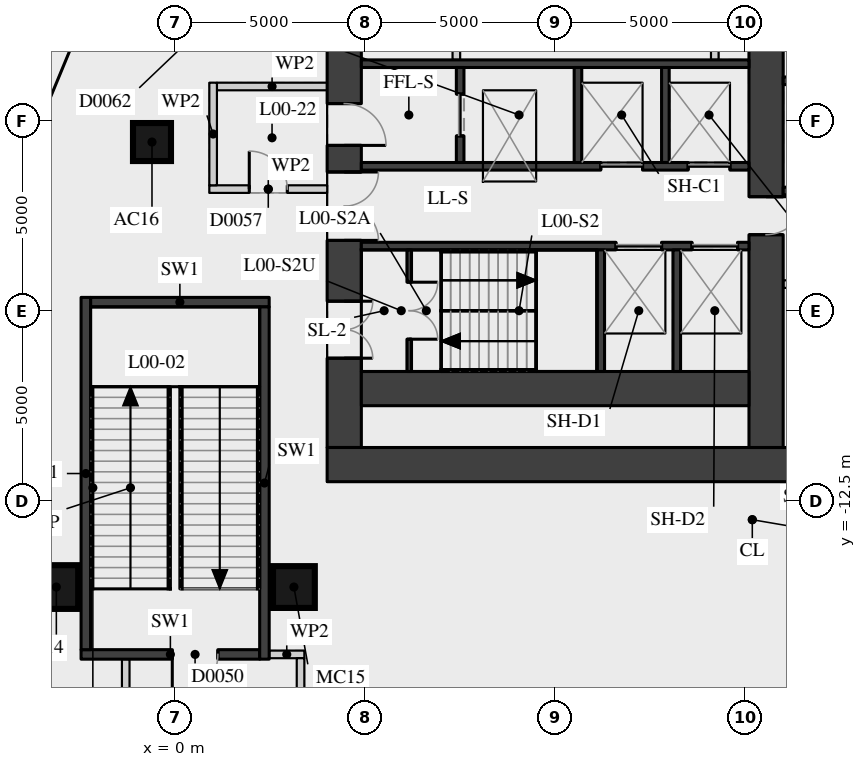
"""IFC4 building model, lengths in metres.
Left out: names, types, materials, properties, quantities, classifications, styles, units other than length and angle.
Written with IfcOpenShell. Run it as: python <this file> out.ifc"""

import sys

from ifc_helpers import new_model, si_unit, direction, frame, frame_2d, origin, origin_2d, place, context, subcontext, project, spatial, rectangle, extrude, element, fill, save


model = new_model("IFC4")
c1 = context("Model", 3, precision=1e-05, world=origin(), true_north=direction((0.0, 1.0)))
c2 = subcontext(c1, "Body", "Model", "MODEL_VIEW")
j1 = project(units=[si_unit("LENGTHUNIT", "METRE"), si_unit("PLANEANGLEUNIT", "RADIAN")], contexts=[c1])
p1 = place(None, origin())
s1 = spatial("IfcSite", under=j1, at=p1, CompositionType="ELEMENT")
p2 = place(p1, origin())
s2 = spatial("IfcBuilding", under=s1, at=p2, CompositionType="ELEMENT")
p3 = place(p2, origin())
s3 = spatial("IfcBuildingStorey", under=s2, at=p3, CompositionType="ELEMENT", Elevation=0.0)
p4 = place(p3, frame((-0.609, -3.062, 0.0), z_axis=(0.0, 0.0, 1.0), x_axis=(1.0, 0.0, 0.0)))
e1 = element("IfcColumn", 1, at=p4, inside=s3, PredefinedType="COLUMN", context=c2, shape_type="SweptSolid", body=[
    extrude(rectangle(XDim=1.0, YDim=1.0, at=origin_2d()), origin(), (0.0, 0.0, 1.0), 7.5),
])
p5 = place(p3, frame((-3.126, -14.772, 0.0), z_axis=(0.0, 0.0, 1.0), x_axis=(1.0, 0.0, 0.0)))
e2 = element("IfcColumn", 2, at=p5, inside=s3, PredefinedType="COLUMN", context=c2, shape_type="SweptSolid", body=[
    extrude(rectangle(XDim=1.15, YDim=1.15, at=origin_2d()), origin(), (0.0, 0.0, 1.0), 7.5),
])
p6 = place(p3, frame((3.126, -14.772, 0.0), z_axis=(0.0, 0.0, 1.0), x_axis=(1.0, 0.0, 0.0)))
e3 = element("IfcColumn", 3, at=p6, inside=s3, PredefinedType="COLUMN", context=c2, shape_type="SweptSolid", body=[
    extrude(rectangle(XDim=1.1, YDim=1.1, at=origin_2d()), origin(), (0.0, 0.0, 1.0), 7.5),
])
p7 = place(p3, frame((4.45, -11.1, 0.0), z_axis=(0.0, 0.0, 1.0), x_axis=(0.0, 1.0, 0.0)))
e4 = element("IfcWall", 4, at=p7, inside=s3, PredefinedType="SHEAR", context=c2, shape_type="SweptSolid", body=[
    extrude(rectangle(XDim=22.2, YDim=0.9, at=frame_2d((11.1, 0.0))), origin(), (0.0, 0.0, 1.0), 7.09),
])
p8 = place(p7, frame((2.35, 0.0, 0.0)))
e5 = element("IfcOpeningElement", 5, at=p8, cuts=e4, PredefinedType="OPENING", context=c2, shape_type="SweptSolid", body=[
    extrude(rectangle(XDim=1.5, YDim=2.1, at=frame_2d((0.75, 1.05))), frame((0.0, 0.46, 0.0), z_axis=(0.0, -1.0, 0.0), x_axis=(1.0, 0.0, 0.0)), (0.0, 0.0, 1.0), 0.92),
])
p9 = place(p7, frame((5.45, 0.0, 0.0)))
e6 = element("IfcOpeningElement", 6, at=p9, cuts=e4, PredefinedType="OPENING", context=c2, shape_type="SweptSolid", body=[
    extrude(rectangle(XDim=1.8, YDim=2.1, at=frame_2d((0.9, 1.05))), frame((0.0, 0.46, 0.0), z_axis=(0.0, -1.0, 0.0), x_axis=(1.0, 0.0, 0.0)), (0.0, 0.0, 1.0), 0.92),
])
p10 = place(p7, frame((7.95, 0.0, 0.0)))
e7 = element("IfcOpeningElement", 7, at=p10, cuts=e4, PredefinedType="OPENING", context=c2, shape_type="SweptSolid", body=[
    extrude(rectangle(XDim=1.1, YDim=2.1, at=frame_2d((0.55, 1.05))), frame((0.0, 0.46, 0.0), z_axis=(0.0, -1.0, 0.0), x_axis=(1.0, 0.0, 0.0)), (0.0, 0.0, 1.0), 0.92),
])
p11 = place(p7, frame((10.6, 0.0, 0.0)))
e8 = element("IfcOpeningElement", 8, at=p11, cuts=e4, PredefinedType="OPENING", context=c2, shape_type="SweptSolid", body=[
    extrude(rectangle(XDim=1.0, YDim=2.1, at=frame_2d((0.5, 1.05))), frame((0.0, 0.46, 0.0), z_axis=(0.0, -1.0, 0.0), x_axis=(1.0, 0.0, 0.0)), (0.0, 0.0, 1.0), 0.92),
])
p12 = place(p7, frame((13.15, 0.0, 0.0)))
e9 = element("IfcOpeningElement", 9, at=p12, cuts=e4, PredefinedType="OPENING", context=c2, shape_type="SweptSolid", body=[
    extrude(rectangle(XDim=1.1, YDim=2.1, at=frame_2d((0.55, 1.05))), frame((0.0, 0.46, 0.0), z_axis=(0.0, -1.0, 0.0), x_axis=(1.0, 0.0, 0.0)), (0.0, 0.0, 1.0), 0.92),
])
p13 = place(p7, frame((14.95, 0.0, 0.0)))
e10 = element("IfcOpeningElement", 10, at=p13, cuts=e4, PredefinedType="OPENING", context=c2, shape_type="SweptSolid", body=[
    extrude(rectangle(XDim=1.8, YDim=2.1, at=frame_2d((0.9, 1.05))), frame((0.0, 0.46, 0.0), z_axis=(0.0, -1.0, 0.0), x_axis=(1.0, 0.0, 0.0)), (0.0, 0.0, 1.0), 0.92),
])
p14 = place(p7, frame((18.35, 0.0, 0.0)))
e11 = element("IfcOpeningElement", 11, at=p14, cuts=e4, PredefinedType="OPENING", context=c2, shape_type="SweptSolid", body=[
    extrude(rectangle(XDim=1.5, YDim=2.1, at=frame_2d((0.75, 1.05))), frame((0.0, 0.46, 0.0), z_axis=(0.0, -1.0, 0.0), x_axis=(1.0, 0.0, 0.0)), (0.0, 0.0, 1.0), 0.92),
])
p15 = place(p3, frame((4.0, -11.55, 0.0), z_axis=(0.0, 0.0, 1.0), x_axis=(1.0, 0.0, 0.0)))
e12 = element("IfcWall", 12, at=p15, inside=s3, PredefinedType="SHEAR", context=c2, shape_type="SweptSolid", body=[
    extrude(rectangle(XDim=15.2, YDim=0.9, at=frame_2d((7.6, 0.0))), origin(), (0.0, 0.0, 1.0), 7.09),
])
p16 = place(p3, frame((15.55, -11.1, 0.0), z_axis=(0.0, 0.0, 1.0), x_axis=(0.0, 1.0, 0.0)))
e13 = element("IfcWall", 13, at=p16, inside=s3, PredefinedType="SHEAR", context=c2, shape_type="SweptSolid", body=[
    extrude(rectangle(XDim=22.2, YDim=0.9, at=frame_2d((11.1, 0.0))), origin(), (0.0, 0.0, 1.0), 7.09),
])
p17 = place(p16, frame((15.6, 0.0, 0.0)))
e14 = element("IfcOpeningElement", 14, at=p17, cuts=e13, PredefinedType="OPENING", context=c2, shape_type="SweptSolid", body=[
    extrude(rectangle(XDim=1.0, YDim=2.1, at=frame_2d((0.5, 1.05))), frame((0.0, 0.46, 0.0), z_axis=(0.0, -1.0, 0.0), x_axis=(1.0, 0.0, 0.0)), (0.0, 0.0, 1.0), 0.92),
])
p18 = place(p16, frame((5.6, 0.0, 0.0)))
e15 = element("IfcOpeningElement", 15, at=p18, cuts=e13, PredefinedType="OPENING", context=c2, shape_type="SweptSolid", body=[
    extrude(rectangle(XDim=1.0, YDim=2.1, at=frame_2d((0.5, 1.05))), frame((0.0, 0.46, 0.0), z_axis=(0.0, -1.0, 0.0), x_axis=(1.0, 0.0, 0.0)), (0.0, 0.0, 1.0), 0.92),
])
p19 = place(p3, frame((4.9, -9.55, 0.0), z_axis=(0.0, 0.0, 1.0), x_axis=(1.0, 0.0, 0.0)))
e16 = element("IfcWall", 16, at=p19, inside=s3, PredefinedType="SHEAR", context=c2, shape_type="SweptSolid", body=[
    extrude(rectangle(XDim=10.2, YDim=0.9, at=frame_2d((5.1, 0.0))), origin(), (0.0, 0.0, 1.0), 7.09),
])
p20 = place(p3, frame((4.9, -1.0, 0.0), z_axis=(0.0, 0.0, 1.0), x_axis=(1.0, 0.0, 0.0)))
e17 = element("IfcWall", 17, at=p20, inside=s3, PredefinedType="SHEAR", context=c2, shape_type="SweptSolid", body=[
    extrude(rectangle(XDim=10.2, YDim=0.2, at=frame_2d((5.1, 0.0))), origin(), (0.0, 0.0, 1.0), 7.09),
])
p21 = place(p3, frame((4.9, -3.7, 0.0), z_axis=(0.0, 0.0, 1.0), x_axis=(1.0, 0.0, 0.0)))
e18 = element("IfcWall", 18, at=p21, inside=s3, PredefinedType="SHEAR", context=c2, shape_type="SweptSolid", body=[
    extrude(rectangle(XDim=10.2, YDim=0.2, at=frame_2d((5.1, 0.0))), origin(), (0.0, 0.0, 1.0), 7.09),
])
p22 = place(p21, frame((6.3, 0.0, 0.0)))
e19 = element("IfcOpeningElement", 19, at=p22, cuts=e18, PredefinedType="OPENING", context=c2, shape_type="SweptSolid", body=[
    extrude(rectangle(XDim=1.1, YDim=2.1, at=frame_2d((0.55, 1.05))), frame((0.0, 0.11, 0.0), z_axis=(0.0, -1.0, 0.0), x_axis=(1.0, 0.0, 0.0)), (0.0, 0.0, 1.0), 0.22),
])
p23 = place(p21, frame((8.6, 0.0, 0.0)))
e20 = element("IfcOpeningElement", 20, at=p23, cuts=e18, PredefinedType="OPENING", context=c2, shape_type="SweptSolid", body=[
    extrude(rectangle(XDim=1.1, YDim=2.1, at=frame_2d((0.55, 1.05))), frame((0.0, 0.11, 0.0), z_axis=(0.0, -1.0, 0.0), x_axis=(1.0, 0.0, 0.0)), (0.0, 0.0, 1.0), 0.22),
])
p24 = place(p3, frame((4.9, -5.8, 0.0), z_axis=(0.0, 0.0, 1.0), x_axis=(1.0, 0.0, 0.0)))
e21 = element("IfcWall", 21, at=p24, inside=s3, PredefinedType="SHEAR", context=c2, shape_type="SweptSolid", body=[
    extrude(rectangle(XDim=10.2, YDim=0.2, at=frame_2d((5.1, 0.0))), origin(), (0.0, 0.0, 1.0), 7.09),
])
p25 = place(p24, frame((6.7, 0.0, 0.0)))
e22 = element("IfcOpeningElement", 22, at=p25, cuts=e21, PredefinedType="OPENING", context=c2, shape_type="SweptSolid", body=[
    extrude(rectangle(XDim=1.2, YDim=2.1, at=frame_2d((0.6, 1.05))), frame((0.0, 0.11, 0.0), z_axis=(0.0, -1.0, 0.0), x_axis=(1.0, 0.0, 0.0)), (0.0, 0.0, 1.0), 0.22),
])
p26 = place(p24, frame((8.7, 0.0, 0.0)))
e23 = element("IfcOpeningElement", 23, at=p26, cuts=e21, PredefinedType="OPENING", context=c2, shape_type="SweptSolid", body=[
    extrude(rectangle(XDim=1.2, YDim=2.1, at=frame_2d((0.6, 1.05))), frame((0.0, 0.11, 0.0), z_axis=(0.0, -1.0, 0.0), x_axis=(1.0, 0.0, 0.0)), (0.0, 0.0, 1.0), 0.22),
])
for number, where, z_axis, x_axis in (
    (24, (11.2, -9.1, 0.0), (0.0, 0.0, 1.0), (0.0, 1.0, 0.0)),
    (25, (13.2, -9.1, 0.0), (0.0, 0.0, 1.0), (0.0, 1.0, 0.0)),
):
    element("IfcWall", number, at=place(p3, frame(where, z_axis=z_axis, x_axis=x_axis)), inside=s3, PredefinedType="SHEAR", context=c2, shape_type="SweptSolid", body=[
        extrude(rectangle(XDim=3.2, YDim=0.2, at=frame_2d((1.6, 0.0))), origin(), (0.0, 0.0, 1.0), 7.09),
    ])
p27 = place(p3, frame((7.5, -3.6, 0.0), z_axis=(0.0, 0.0, 1.0), x_axis=(0.0, 1.0, 0.0)))
e26 = element("IfcWall", 26, at=p27, inside=s3, PredefinedType="SHEAR", context=c2, shape_type="SweptSolid", body=[
    extrude(rectangle(XDim=2.5, YDim=0.2, at=frame_2d((1.25, 0.0))), origin(), (0.0, 0.0, 1.0), 7.09),
])
p28 = place(p27, frame((0.7, 0.0, 0.0)))
e27 = element("IfcOpeningElement", 27, at=p28, cuts=e26, PredefinedType="OPENING", context=c2, shape_type="SweptSolid", body=[
    extrude(rectangle(XDim=1.1, YDim=2.1, at=frame_2d((0.55, 1.05))), frame((0.0, 0.11, 0.0), z_axis=(0.0, -1.0, 0.0), x_axis=(1.0, 0.0, 0.0)), (0.0, 0.0, 1.0), 0.22),
])
for number, where, z_axis, x_axis in (
    (28, (10.6, -3.6, 0.0), (0.0, 0.0, 1.0), (0.0, 1.0, 0.0)),
    (29, (12.9, -3.6, 0.0), (0.0, 0.0, 1.0), (0.0, 1.0, 0.0)),
):
    element("IfcWall", number, at=place(p3, frame(where, z_axis=z_axis, x_axis=x_axis)), inside=s3, PredefinedType="SHEAR", context=c2, shape_type="SweptSolid", body=[
        extrude(rectangle(XDim=2.5, YDim=0.2, at=frame_2d((1.25, 0.0))), origin(), (0.0, 0.0, 1.0), 7.09),
    ])
p29 = place(p3, frame((6.16, -9.1, 0.0), z_axis=(0.0, 0.0, 1.0), x_axis=(0.0, 1.0, 0.0)))
e30 = element("IfcWall", 30, at=p29, inside=s3, PredefinedType="SHEAR", context=c2, shape_type="SweptSolid", body=[
    extrude(rectangle(XDim=3.2, YDim=0.12, at=frame_2d((1.6, 0.0))), origin(), (0.0, 0.0, 1.0), 3.54),
])
p30 = place(p29, frame((0.85, 0.0, 0.0)))
e31 = element("IfcOpeningElement", 31, at=p30, cuts=e30, PredefinedType="OPENING", context=c2, shape_type="SweptSolid", body=[
    extrude(rectangle(XDim=1.5, YDim=2.1, at=frame_2d((0.75, 1.05))), frame((0.0, 0.07, 0.0), z_axis=(0.0, -1.0, 0.0), x_axis=(1.0, 0.0, 0.0)), (0.0, 0.0, 1.0), 0.14),
])
p31 = place(p3, frame((7.4, -0.9, 0.0), z_axis=(0.0, 0.0, 1.0), x_axis=(0.0, 1.0, 0.0)))
e32 = element("IfcWall", 32, at=p31, inside=s3, PredefinedType="PARTITIONING", context=c2, shape_type="SweptSolid", body=[
    extrude(rectangle(XDim=1.8, YDim=0.2, at=frame_2d((0.9, 0.0))), origin(), (0.0, 0.0, 1.0), 7.09),
])
p32 = place(p31, frame((0.45, 0.0, 0.0)))
e33 = element("IfcOpeningElement", 33, at=p32, cuts=e32, PredefinedType="OPENING", context=c2, shape_type="SweptSolid", body=[
    extrude(rectangle(XDim=0.9, YDim=2.1, at=frame_2d((0.45, 1.05))), frame((0.0, 0.11, 0.0), z_axis=(0.0, -1.0, 0.0), x_axis=(1.0, 0.0, 0.0)), (0.0, 0.0, 1.0), 0.22),
])
p33 = place(p3, frame((14.2, -0.9, 0.0), z_axis=(0.0, 0.0, 1.0), x_axis=(0.0, 1.0, 0.0)))
e34 = element("IfcWall", 34, at=p33, inside=s3, PredefinedType="PARTITIONING", context=c2, shape_type="SweptSolid", body=[
    extrude(rectangle(XDim=1.8, YDim=0.2, at=frame_2d((0.9, 0.0))), origin(), (0.0, 0.0, 1.0), 7.09),
])
for number, where, z_axis, x_axis in (
    (35, (16.0, -4.35, 0.0), (0.0, 0.0, 1.0), (1.0, 0.0, 0.0)),
    (36, (16.0, -1.45, 0.0), (0.0, 0.0, 1.0), (1.0, 0.0, 0.0)),
):
    element("IfcWall", number, at=place(p3, frame(where, z_axis=z_axis, x_axis=x_axis)), inside=s3, PredefinedType="SHEAR", context=c2, shape_type="SweptSolid", body=[
        extrude(rectangle(XDim=2.3, YDim=0.2, at=frame_2d((1.15, 0.0))), origin(), (0.0, 0.0, 1.0), 7.09),
    ])
p34 = place(p3, frame((16.0, -6.8, 0.0), z_axis=(0.0, 0.0, 1.0), x_axis=(1.0, 0.0, 0.0)))
e37 = element("IfcWall", 37, at=p34, inside=s3, PredefinedType="PARTITIONING", context=c2, shape_type="SweptSolid", body=[
    extrude(rectangle(XDim=2.3, YDim=0.2, at=frame_2d((1.15, 0.0))), origin(), (0.0, 0.0, 1.0), 7.09),
])
p35 = place(p34, frame((0.2, 0.0, 0.0)))
e38 = element("IfcOpeningElement", 38, at=p35, cuts=e37, PredefinedType="OPENING", context=c2, shape_type="SweptSolid", body=[
    extrude(rectangle(XDim=0.9, YDim=2.1, at=frame_2d((0.45, 1.05))), frame((0.0, 0.11, 0.0), z_axis=(0.0, -1.0, 0.0), x_axis=(1.0, 0.0, 0.0)), (0.0, 0.0, 1.0), 0.22),
])
p36 = place(p3, frame((-2.475, -16.545, 0.0), z_axis=(0.0, 0.0, 1.0), x_axis=(1.0, 0.0, 0.0)))
e39 = element("IfcWall", 39, at=p36, inside=s3, PredefinedType="SOLIDWALL", context=c2, shape_type="SweptSolid", body=[
    extrude(rectangle(XDim=4.7, YDim=0.25, at=frame_2d((2.35, 0.0))), origin(), (0.0, 0.0, 1.0), 7.09),
])
p37 = place(p36, frame((2.4, 0.0, 0.0)))
e40 = element("IfcOpeningElement", 40, at=p37, cuts=e39, PredefinedType="OPENING", context=c2, shape_type="SweptSolid", body=[
    extrude(rectangle(XDim=1.2, YDim=2.1, at=frame_2d((0.6, 1.05))), frame((0.0, 0.135, 0.0), z_axis=(0.0, -1.0, 0.0), x_axis=(1.0, 0.0, 0.0)), (0.0, 0.0, 1.0), 0.27),
])
p38 = place(p3, frame((2.475, -16.545, 0.0), z_axis=(0.0, 0.0, 1.0), x_axis=(1.0, 0.0, 0.0)))
e41 = element("IfcWall", 41, at=p38, inside=s3, PredefinedType="PARTITIONING", context=c2, shape_type="SweptSolid", body=[
    extrude(rectangle(XDim=0.925, YDim=0.2, at=frame_2d((0.462, 0.0))), origin(), (0.0, 0.0, 1.0), 7.09),
])
p39 = place(p3, frame((-2.225, -7.275, 0.0), z_axis=(0.0, 0.0, 1.0), x_axis=(1.0, 0.0, 0.0)))
e42 = element("IfcWall", 42, at=p39, inside=s3, PredefinedType="SOLIDWALL", context=c2, shape_type="SweptSolid", body=[
    extrude(rectangle(XDim=4.7, YDim=0.25, at=frame_2d((2.35, 0.0))), origin(), (0.0, 0.0, 1.0), 7.09),
])
p40 = place(p3, frame((0.9, -4.3, 0.0), z_axis=(0.0, 0.0, 1.0), x_axis=(1.0, 0.0, 0.0)))
e43 = element("IfcWall", 43, at=p40, inside=s3, PredefinedType="PARTITIONING", context=c2, shape_type="SweptSolid", body=[
    extrude(rectangle(XDim=3.102, YDim=0.2, at=frame_2d((1.551, 0.0))), origin(), (0.0, 0.0, 1.0), 7.09),
])
p41 = place(p40, frame((1.051, 0.0, 0.0)))
e44 = element("IfcOpeningElement", 44, at=p41, cuts=e43, PredefinedType="OPENING", context=c2, shape_type="SweptSolid", body=[
    extrude(rectangle(XDim=1.0, YDim=2.1, at=frame_2d((0.5, 1.05))), frame((0.0, 0.11, 0.0), z_axis=(0.0, -1.0, 0.0), x_axis=(1.0, 0.0, 0.0)), (0.0, 0.0, 1.0), 0.22),
])
p42 = place(p3, frame((1.1, -1.6, 0.0), z_axis=(0.0, 0.0, 1.0), x_axis=(1.0, 0.0, 0.0)))
e45 = element("IfcWall", 45, at=p42, inside=s3, PredefinedType="PARTITIONING", context=c2, shape_type="SweptSolid", body=[
    extrude(rectangle(XDim=2.902, YDim=0.2, at=frame_2d((1.451, 0.0))), origin(), (0.0, 0.0, 1.0), 7.09),
])
p43 = place(p3, frame((-2.35, -16.42, 0.0), z_axis=(0.0, 0.0, 1.0), x_axis=(0.0, 1.0, 0.0)))
e46 = element("IfcWall", 46, at=p43, inside=s3, PredefinedType="SOLIDWALL", context=c2, shape_type="SweptSolid", body=[
    extrude(rectangle(XDim=9.27, YDim=0.25, at=frame_2d((4.635, 0.0))), origin(), (0.0, 0.0, 1.0), 7.09),
])
p44 = place(p3, frame((-1.3, -18.845, 0.0), z_axis=(0.0, 0.0, 1.0), x_axis=(0.0, 1.0, 0.0)))
e47 = element("IfcWall", 47, at=p44, inside=s3, PredefinedType="PARTITIONING", context=c2, shape_type="SweptSolid", body=[
    extrude(rectangle(XDim=2.175, YDim=0.2, at=frame_2d((1.087, 0.0))), origin(), (0.0, 0.0, 1.0), 7.09),
])
p45 = place(p3, frame((1.0, -4.2, 0.0), z_axis=(0.0, 0.0, 1.0), x_axis=(0.0, 1.0, 0.0)))
e48 = element("IfcWall", 48, at=p45, inside=s3, PredefinedType="PARTITIONING", context=c2, shape_type="SweptSolid", body=[
    extrude(rectangle(XDim=2.7, YDim=0.2, at=frame_2d((1.35, 0.0))), origin(), (0.0, 0.0, 1.0), 7.09),
])
p46 = place(p3, frame((2.35, -16.67, 0.0), z_axis=(0.0, 0.0, 1.0), x_axis=(0.0, 1.0, 0.0)))
e49 = element("IfcWall", 49, at=p46, inside=s3, PredefinedType="SOLIDWALL", context=c2, shape_type="SweptSolid", body=[
    extrude(rectangle(XDim=9.27, YDim=0.25, at=frame_2d((4.635, 0.0))), origin(), (0.0, 0.0, 1.0), 7.09),
])
p47 = place(p3, frame((3.3, -30.45, 0.0), z_axis=(0.0, 0.0, 1.0), x_axis=(0.0, 1.0, 0.0)))
e50 = element("IfcWall", 50, at=p47, inside=s3, PredefinedType="PARTITIONING", context=c2, shape_type="SweptSolid", body=[
    extrude(rectangle(XDim=13.805, YDim=0.2, at=frame_2d((6.902, 0.0))), origin(), (0.0, 0.0, 1.0), 7.09),
])
p48 = place(p8, origin())
e51 = element("IfcDoor", 51, at=p48, inside=s3, OperationType="DOUBLE_DOOR_SINGLE_SWING", PredefinedType="DOOR", context=c2, shape_type="SweptSolid", body=[
    extrude(rectangle(XDim=1.5, YDim=2.1, at=frame_2d((0.75, 1.05))), frame((0.0, 0.025, 0.0), z_axis=(0.0, -1.0, 0.0), x_axis=(1.0, 0.0, 0.0)), (0.0, 0.0, 1.0), 0.05),
])
fill(e5, e51)
p49 = place(p9, origin())
e52 = element("IfcDoor", 52, at=p49, inside=s3, OperationType="DOUBLE_DOOR_SINGLE_SWING", PredefinedType="DOOR", context=c2, shape_type="SweptSolid", body=[
    extrude(rectangle(XDim=1.8, YDim=2.1, at=frame_2d((0.9, 1.05))), frame((0.0, 0.025, 0.0), z_axis=(0.0, -1.0, 0.0), x_axis=(1.0, 0.0, 0.0)), (0.0, 0.0, 1.0), 0.05),
])
fill(e6, e52)
p50 = place(p10, origin())
e53 = element("IfcDoor", 53, at=p50, inside=s3, OperationType="SINGLE_SWING_RIGHT", PredefinedType="DOOR", context=c2, shape_type="SweptSolid", body=[
    extrude(rectangle(XDim=1.1, YDim=2.1, at=frame_2d((0.55, 1.05))), frame((0.0, 0.025, 0.0), z_axis=(0.0, -1.0, 0.0), x_axis=(1.0, 0.0, 0.0)), (0.0, 0.0, 1.0), 0.05),
])
fill(e7, e53)
p51 = place(p30, origin())
e54 = element("IfcDoor", 54, at=p51, inside=s3, OperationType="DOUBLE_DOOR_SINGLE_SWING", PredefinedType="DOOR", context=c2, shape_type="SweptSolid", body=[
    extrude(rectangle(XDim=1.5, YDim=2.1, at=frame_2d((0.75, 1.05))), frame((0.0, 0.025, 0.0), z_axis=(0.0, -1.0, 0.0), x_axis=(1.0, 0.0, 0.0)), (0.0, 0.0, 1.0), 0.05),
])
fill(e31, e54)
p52 = place(p22, origin())
e55 = element("IfcDoor", 55, at=p52, inside=s3, OperationType="DOUBLE_DOOR_SLIDING", PredefinedType="DOOR", context=c2, shape_type="SweptSolid", body=[
    extrude(rectangle(XDim=1.1, YDim=2.1, at=frame_2d((0.55, 1.05))), frame((0.0, 0.025, 0.0), z_axis=(0.0, -1.0, 0.0), x_axis=(1.0, 0.0, 0.0)), (0.0, 0.0, 1.0), 0.05),
])
fill(e19, e55)
p53 = place(p23, origin())
e56 = element("IfcDoor", 56, at=p53, inside=s3, OperationType="DOUBLE_DOOR_SLIDING", PredefinedType="DOOR", context=c2, shape_type="SweptSolid", body=[
    extrude(rectangle(XDim=1.1, YDim=2.1, at=frame_2d((0.55, 1.05))), frame((0.0, 0.025, 0.0), z_axis=(0.0, -1.0, 0.0), x_axis=(1.0, 0.0, 0.0)), (0.0, 0.0, 1.0), 0.05),
])
fill(e20, e56)
p54 = place(p25, origin())
e57 = element("IfcDoor", 57, at=p54, inside=s3, OperationType="DOUBLE_DOOR_SLIDING", PredefinedType="DOOR", context=c2, shape_type="SweptSolid", body=[
    extrude(rectangle(XDim=1.2, YDim=2.1, at=frame_2d((0.6, 1.05))), frame((0.0, 0.025, 0.0), z_axis=(0.0, -1.0, 0.0), x_axis=(1.0, 0.0, 0.0)), (0.0, 0.0, 1.0), 0.05),
])
fill(e22, e57)
p55 = place(p26, origin())
e58 = element("IfcDoor", 58, at=p55, inside=s3, OperationType="DOUBLE_DOOR_SLIDING", PredefinedType="DOOR", context=c2, shape_type="SweptSolid", body=[
    extrude(rectangle(XDim=1.2, YDim=2.1, at=frame_2d((0.6, 1.05))), frame((0.0, 0.025, 0.0), z_axis=(0.0, -1.0, 0.0), x_axis=(1.0, 0.0, 0.0)), (0.0, 0.0, 1.0), 0.05),
])
fill(e23, e58)
p56 = place(p28, origin())
e59 = element("IfcDoor", 59, at=p56, inside=s3, OperationType="DOUBLE_DOOR_SLIDING", PredefinedType="DOOR", context=c2, shape_type="SweptSolid", body=[
    extrude(rectangle(XDim=1.1, YDim=2.1, at=frame_2d((0.55, 1.05))), frame((0.0, 0.025, 0.0), z_axis=(0.0, -1.0, 0.0), x_axis=(1.0, 0.0, 0.0)), (0.0, 0.0, 1.0), 0.05),
])
fill(e27, e59)
p57 = place(p18, origin())
e60 = element("IfcDoor", 60, at=p57, inside=s3, OperationType="SINGLE_SWING_LEFT", PredefinedType="DOOR", context=c2, shape_type="SweptSolid", body=[
    extrude(rectangle(XDim=1.0, YDim=2.1, at=frame_2d((0.5, 1.05))), frame((0.0, 0.025, 0.0), z_axis=(0.0, -1.0, 0.0), x_axis=(1.0, 0.0, 0.0)), (0.0, 0.0, 1.0), 0.05),
])
fill(e15, e60)
p58 = place(p37, origin())
e61 = element("IfcDoor", 61, at=p58, inside=s3, OperationType="SINGLE_SWING_RIGHT", PredefinedType="DOOR", context=c2, shape_type="SweptSolid", body=[
    extrude(rectangle(XDim=1.2, YDim=2.1, at=frame_2d((0.6, 1.05))), frame((0.0, 0.025, 0.0), z_axis=(0.0, -1.0, 0.0), x_axis=(1.0, 0.0, 0.0)), (0.0, 0.0, 1.0), 0.05),
])
fill(e40, e61)
p59 = place(p41, origin())
e62 = element("IfcDoor", 62, at=p59, inside=s3, OperationType="SINGLE_SWING_LEFT", PredefinedType="DOOR", context=c2, shape_type="SweptSolid", body=[
    extrude(rectangle(XDim=1.0, YDim=2.1, at=frame_2d((0.5, 1.05))), frame((0.0, 0.025, 0.0), z_axis=(0.0, -1.0, 0.0), x_axis=(1.0, 0.0, 0.0)), (0.0, 0.0, 1.0), 0.05),
])
fill(e44, e62)
save(model, sys.argv[1])
